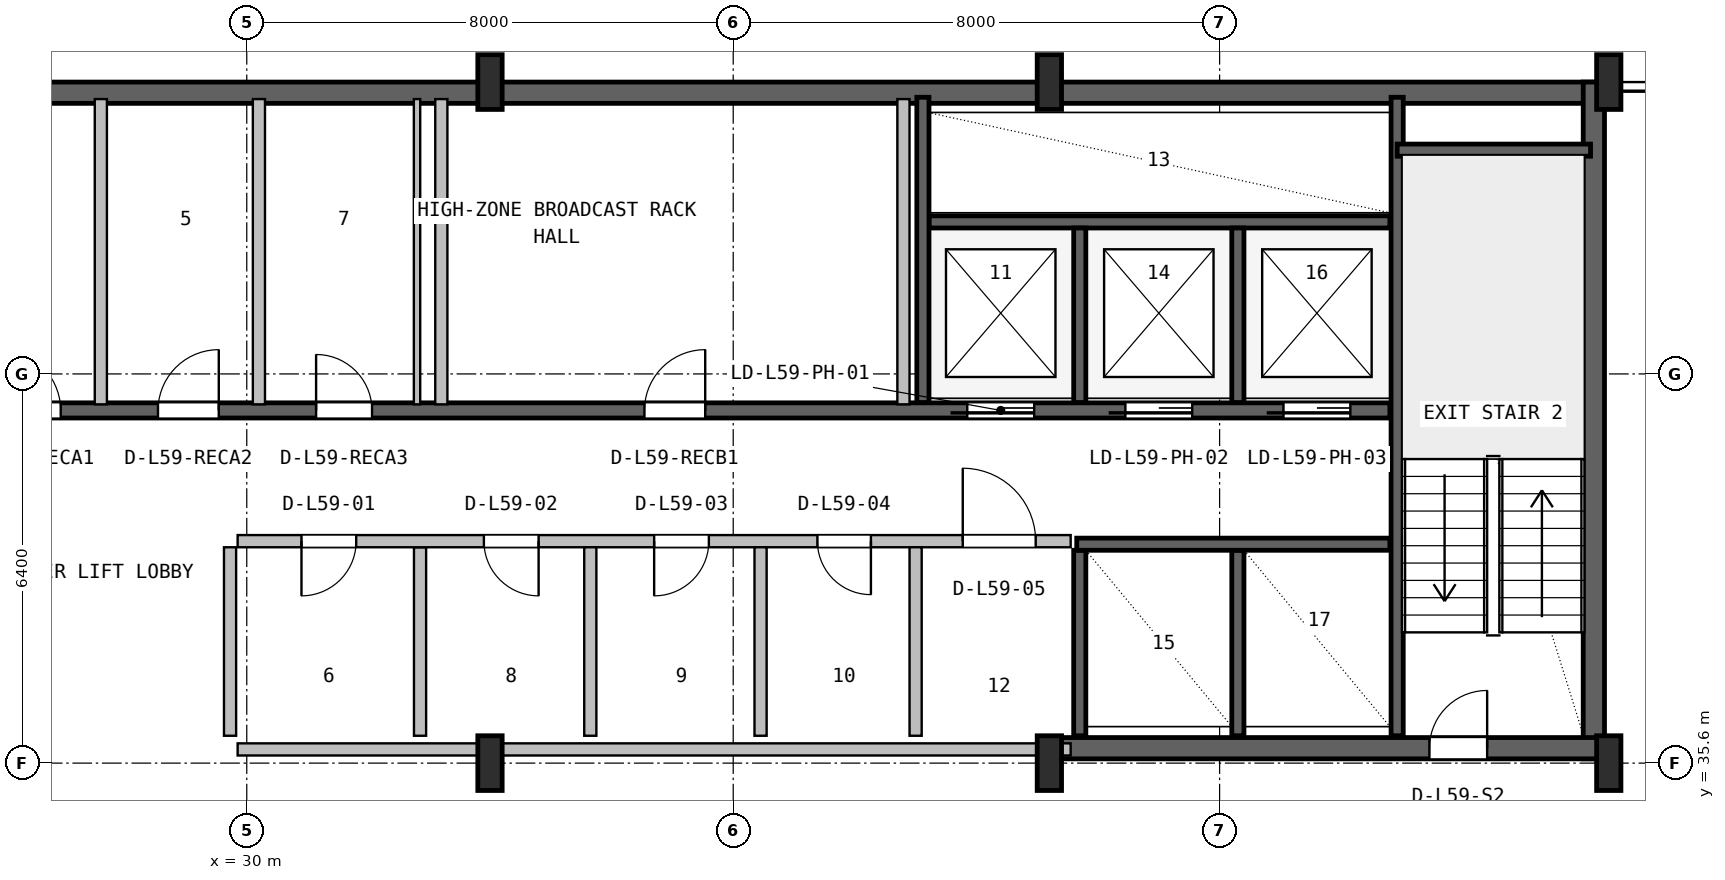
"""IFC4 building model, lengths in metres.
Left out: names, types, materials, properties, quantities, classifications, styles, units other than length and angle.
Written with IfcOpenShell. Run it as: python <this file> out.ifc"""

import sys

from ifc_helpers import new_model, si_unit, direction, frame, frame_2d, origin, origin_2d, place, context, subcontext, project, spatial, rectangle, i_section, extrude, source, transform, mapped, element, fill, save


model = new_model("IFC4")
c1 = context("Model", 3, precision=1e-05, world=origin(), true_north=direction((0.0, 1.0)))
c2 = subcontext(c1, "Body", "Model", "MODEL_VIEW")
j1 = project(units=[si_unit("LENGTHUNIT", "METRE"), si_unit("PLANEANGLEUNIT", "RADIAN")], contexts=[c1])
p1 = place(None, origin())
s1 = spatial("IfcSite", under=j1, at=p1, CompositionType="ELEMENT")
p2 = place(p1, origin())
s2 = spatial("IfcBuilding", under=s1, at=p2, CompositionType="ELEMENT")
p3 = place(p2, frame((0.0, 0.0, 239.4)))
s3 = spatial("IfcBuildingStorey", under=s2, at=p3, CompositionType="ELEMENT", Elevation=239.4)
p4 = place(p3, frame((15.6, 46.625, 0.0), z_axis=(0.0, 0.0, 1.0), x_axis=(1.0, 0.0, 0.0)))
e1 = element("IfcWall", 1, at=p4, inside=s3, PredefinedType="SHEAR", context=c2, shape_type="SweptSolid", body=[
    extrude(rectangle(XDim=36.8, YDim=0.35, at=frame_2d((18.4, 0.0))), origin(), (0.0, 0.0, 1.0), 3.55),
])
p5 = place(p3, frame((52.155, 35.67, 0.0), z_axis=(0.0, 0.0, 1.0), x_axis=(0.0, 1.0, 0.0)))
e2 = element("IfcWall", 2, at=p5, inside=s3, PredefinedType="SHEAR", context=c2, shape_type="SweptSolid", body=[
    extrude(rectangle(XDim=11.13, YDim=0.35, at=frame_2d((5.565, 0.0))), origin(), (0.0, 0.0, 1.0), 3.55),
])
p6 = place(p3, frame((43.2, 35.845, 0.0), z_axis=(0.0, 0.0, 1.0), x_axis=(1.0, 0.0, 0.0)))
e3 = element("IfcWall", 3, at=p6, inside=s3, PredefinedType="SHEAR", context=c2, shape_type="SweptSolid", body=[
    extrude(rectangle(XDim=9.13, YDim=0.35, at=frame_2d((4.565, 0.0))), origin(), (0.0, 0.0, 1.0), 3.55),
])
p7 = place(p6, frame((6.25, 0.0, 0.0)))
e4 = element("IfcOpeningElement", 4, at=p7, cuts=e3, PredefinedType="OPENING", context=c2, shape_type="SweptSolid", body=[
    extrude(rectangle(XDim=0.95, YDim=2.1, at=frame_2d((0.475, 1.05))), frame((0.0, 0.185, 0.0), z_axis=(0.0, -1.0, 0.0), x_axis=(1.0, 0.0, 0.0)), (0.0, 0.0, 1.0), 0.37),
])
m1 = source(origin(), c2, "Body", "SweptSolid", [
    extrude(i_section(OverallWidth=0.4, OverallDepth=0.9, WebThickness=0.016, FlangeThickness=0.028, FilletRadius=0.016, at=origin_2d()), origin(), (0.0, 0.0, 1.0), 3.8),
])
for number, where, z_axis, x_axis in (
    (5, (34.0, 35.6, 0.0), (0.0, 0.0, 1.0), (1.0, 0.0, 0.0)),
    (6, (34.0, 46.8, 0.0), (0.0, 0.0, 1.0), (1.0, 0.0, 0.0)),
    (7, (43.2, 35.6, 0.0), (0.0, 0.0, 1.0), (1.0, 0.0, 0.0)),
    (8, (43.2, 46.8, 0.0), (0.0, 0.0, 1.0), (1.0, 0.0, 0.0)),
    (9, (52.4, 35.6, 0.0), (0.0, 0.0, 1.0), (1.0, 0.0, 0.0)),
    (10, (52.4, 46.8, 0.0), (0.0, 0.0, 1.0), (1.0, 0.0, 0.0)),
):
    element("IfcColumn", number, at=place(p3, frame(where, z_axis=z_axis, x_axis=x_axis)), inside=s3, PredefinedType="COLUMN", context=c2, shape_type="MappedRepresentation", body=[
        mapped(m1, transform((0.0, 0.0, 0.0), x_axis=(1.0, 0.0, 0.0), y_axis=(0.0, 1.0, 0.0), z_axis=(0.0, 0.0, 1.0), scale=1.0)),
    ])
p8 = place(p3, frame((48.92, 36.05, 0.0), z_axis=(0.0, 0.0, 1.0), x_axis=(0.0, 1.0, 0.0)))
e11 = element("IfcWall", 11, at=p8, inside=s3, PredefinedType="SHEAR", context=c2, shape_type="SweptSolid", body=[
    extrude(rectangle(XDim=10.5, YDim=0.2, at=frame_2d((5.25, 0.0))), origin(), (0.0, 0.0, 1.0), 3.55),
])
p9 = place(p3, frame((48.92, 45.68, 0.0), z_axis=(0.0, 0.0, 1.0), x_axis=(1.0, 0.0, 0.0)))
e12 = element("IfcWall", 12, at=p9, inside=s3, PredefinedType="SHEAR", context=c2, shape_type="SweptSolid", body=[
    extrude(rectangle(XDim=3.18, YDim=0.2, at=frame_2d((1.59, 0.0))), origin(), (0.0, 0.0, 1.0), 3.55),
])
p10 = place(p3, frame((24.98, 41.4, 0.0), z_axis=(0.0, 0.0, 1.0), x_axis=(1.0, 0.0, 0.0)))
e13 = element("IfcWall", 13, at=p10, inside=s3, PredefinedType="SHEAR", context=c2, shape_type="SweptSolid", body=[
    extrude(rectangle(XDim=23.82, YDim=0.25, at=frame_2d((11.91, 0.0))), origin(), (0.0, 0.0, 1.0), 3.55),
])
p11 = place(p10, frame((16.87, 0.0, 0.0)))
e14 = element("IfcOpeningElement", 14, at=p11, cuts=e13, PredefinedType="OPENING", context=c2, shape_type="SweptSolid", body=[
    extrude(rectangle(XDim=1.1, YDim=2.18, at=frame_2d((0.55, 1.09))), frame((0.0, 0.135, 0.0), z_axis=(0.0, -1.0, 0.0), x_axis=(1.0, 0.0, 0.0)), (0.0, 0.0, 1.0), 0.27),
])
p12 = place(p10, frame((19.47, 0.0, 0.0)))
e15 = element("IfcOpeningElement", 15, at=p12, cuts=e13, PredefinedType="OPENING", context=c2, shape_type="SweptSolid", body=[
    extrude(rectangle(XDim=1.1, YDim=2.18, at=frame_2d((0.55, 1.09))), frame((0.0, 0.135, 0.0), z_axis=(0.0, -1.0, 0.0), x_axis=(1.0, 0.0, 0.0)), (0.0, 0.0, 1.0), 0.27),
])
p13 = place(p10, frame((22.07, 0.0, 0.0)))
e16 = element("IfcOpeningElement", 16, at=p13, cuts=e13, PredefinedType="OPENING", context=c2, shape_type="SweptSolid", body=[
    extrude(rectangle(XDim=1.1, YDim=2.18, at=frame_2d((0.55, 1.09))), frame((0.0, 0.135, 0.0), z_axis=(0.0, -1.0, 0.0), x_axis=(1.0, 0.0, 0.0)), (0.0, 0.0, 1.0), 0.27),
])
p14 = place(p10, frame((0.96, 0.0, 0.0)))
e17 = element("IfcOpeningElement", 17, at=p14, cuts=e13, PredefinedType="OPENING", context=c2, shape_type="SweptSolid", body=[
    extrude(rectangle(XDim=1.0, YDim=2.08, at=frame_2d((0.5, 1.04))), frame((0.0, 0.135, 0.0), z_axis=(0.0, -1.0, 0.0), x_axis=(1.0, 0.0, 0.0)), (0.0, 0.0, 1.0), 0.27),
])
p15 = place(p10, frame((3.56, 0.0, 0.0)))
e18 = element("IfcOpeningElement", 18, at=p15, cuts=e13, PredefinedType="OPENING", context=c2, shape_type="SweptSolid", body=[
    extrude(rectangle(XDim=1.0, YDim=2.08, at=frame_2d((0.5, 1.04))), frame((0.0, 0.135, 0.0), z_axis=(0.0, -1.0, 0.0), x_axis=(1.0, 0.0, 0.0)), (0.0, 0.0, 1.0), 0.27),
])
p16 = place(p10, frame((6.16, 0.0, 0.0)))
e19 = element("IfcOpeningElement", 19, at=p16, cuts=e13, PredefinedType="OPENING", context=c2, shape_type="SweptSolid", body=[
    extrude(rectangle(XDim=0.92, YDim=2.08, at=frame_2d((0.46, 1.04))), frame((0.0, 0.135, 0.0), z_axis=(0.0, -1.0, 0.0), x_axis=(1.0, 0.0, 0.0)), (0.0, 0.0, 1.0), 0.27),
])
p17 = place(p10, frame((11.56, 0.0, 0.0)))
e20 = element("IfcOpeningElement", 20, at=p17, cuts=e13, PredefinedType="OPENING", context=c2, shape_type="SweptSolid", body=[
    extrude(rectangle(XDim=1.0, YDim=2.08, at=frame_2d((0.5, 1.04))), frame((0.0, 0.135, 0.0), z_axis=(0.0, -1.0, 0.0), x_axis=(1.0, 0.0, 0.0)), (0.0, 0.0, 1.0), 0.27),
])
p18 = place(p3, frame((41.22, 44.5, 0.0), z_axis=(0.0, 0.0, 1.0), x_axis=(1.0, 0.0, 0.0)))
e21 = element("IfcWall", 21, at=p18, inside=s3, PredefinedType="SHEAR", context=c2, shape_type="SweptSolid", body=[
    extrude(rectangle(XDim=7.58, YDim=0.2, at=frame_2d((3.79, 0.0))), origin(), (0.0, 0.0, 1.0), 3.55),
])
p19 = place(p3, frame((41.12, 41.53, 0.0), z_axis=(0.0, 0.0, 1.0), x_axis=(0.0, 1.0, 0.0)))
e22 = element("IfcWall", 22, at=p19, inside=s3, PredefinedType="SHEAR", context=c2, shape_type="SweptSolid", body=[
    extrude(rectangle(XDim=5.02, YDim=0.2, at=frame_2d((2.51, 0.0))), origin(), (0.0, 0.0, 1.0), 3.55),
])
for number, where, z_axis, x_axis in (
    (23, (43.7, 41.53, 0.0), (0.0, 0.0, 1.0), (0.0, 1.0, 0.0)),
    (24, (46.3, 41.53, 0.0), (0.0, 0.0, 1.0), (0.0, 1.0, 0.0)),
):
    element("IfcWall", number, at=place(p3, frame(where, z_axis=z_axis, x_axis=x_axis)), inside=s3, PredefinedType="SHEAR", context=c2, shape_type="SweptSolid", body=[
        extrude(rectangle(XDim=2.87, YDim=0.2, at=frame_2d((1.435, 0.0))), origin(), (0.0, 0.0, 1.0), 3.55),
    ])
for number, where, z_axis, x_axis in (
    (25, (43.7, 36.05, 0.0), (0.0, 0.0, 1.0), (0.0, 1.0, 0.0)),
    (26, (46.3, 36.05, 0.0), (0.0, 0.0, 1.0), (0.0, 1.0, 0.0)),
):
    element("IfcWall", number, at=place(p3, frame(where, z_axis=z_axis, x_axis=x_axis)), inside=s3, PredefinedType="SHEAR", context=c2, shape_type="SweptSolid", body=[
        extrude(rectangle(XDim=3.05, YDim=0.2, at=frame_2d((1.525, 0.0))), origin(), (0.0, 0.0, 1.0), 3.55),
    ])
p20 = place(p3, frame((43.65, 39.2, 0.0), z_axis=(0.0, 0.0, 1.0), x_axis=(1.0, 0.0, 0.0)))
e27 = element("IfcWall", 27, at=p20, inside=s3, PredefinedType="SHEAR", context=c2, shape_type="SweptSolid", body=[
    extrude(rectangle(XDim=5.15, YDim=0.2, at=frame_2d((2.575, 0.0))), origin(), (0.0, 0.0, 1.0), 3.55),
])
p21 = place(p3, frame((29.85, 35.825, 0.0), z_axis=(0.0, 0.0, 1.0), x_axis=(1.0, 0.0, 0.0)))
e28 = element("IfcWall", 28, at=p21, inside=s3, PredefinedType="SOLIDWALL", context=c2, shape_type="SweptSolid", body=[
    extrude(rectangle(XDim=13.7, YDim=0.2, at=frame_2d((6.85, 0.0))), origin(), (0.0, 0.0, 1.0), 2.575),
])
p22 = place(p3, frame((32.85, 36.05, 0.0), z_axis=(0.0, 0.0, 1.0), x_axis=(0.0, 1.0, 0.0)))
e29 = element("IfcWall", 29, at=p22, inside=s3, PredefinedType="PLUMBINGWALL", context=c2, shape_type="SweptSolid", body=[
    extrude(rectangle(XDim=3.1, YDim=0.2, at=frame_2d((1.55, 0.0))), origin(), (0.0, 0.0, 1.0), 3.53),
])
p23 = place(p3, frame((29.85, 39.25, 0.0), z_axis=(0.0, 0.0, 1.0), x_axis=(1.0, 0.0, 0.0)))
e30 = element("IfcWall", 30, at=p23, inside=s3, PredefinedType="SOLIDWALL", context=c2, shape_type="SweptSolid", body=[
    extrude(rectangle(XDim=13.7, YDim=0.2, at=frame_2d((6.85, 0.0))), origin(), (0.0, 0.0, 1.0), 3.53),
])
p24 = place(p23, frame((1.05, 0.0, 0.0)))
e31 = element("IfcOpeningElement", 31, at=p24, cuts=e30, PredefinedType="OPENING", context=c2, shape_type="SweptSolid", body=[
    extrude(rectangle(XDim=0.9, YDim=2.06, at=frame_2d((0.45, 1.03))), frame((0.0, 0.11, 0.0), z_axis=(0.0, -1.0, 0.0), x_axis=(1.0, 0.0, 0.0)), (0.0, 0.0, 1.0), 0.22),
])
p25 = place(p23, frame((4.05, 0.0, 0.0)))
e32 = element("IfcOpeningElement", 32, at=p25, cuts=e30, PredefinedType="OPENING", context=c2, shape_type="SweptSolid", body=[
    extrude(rectangle(XDim=0.9, YDim=2.06, at=frame_2d((0.45, 1.03))), frame((0.0, 0.11, 0.0), z_axis=(0.0, -1.0, 0.0), x_axis=(1.0, 0.0, 0.0)), (0.0, 0.0, 1.0), 0.22),
])
p26 = place(p23, frame((6.85, 0.0, 0.0)))
e33 = element("IfcOpeningElement", 33, at=p26, cuts=e30, PredefinedType="OPENING", context=c2, shape_type="SweptSolid", body=[
    extrude(rectangle(XDim=0.9, YDim=2.06, at=frame_2d((0.45, 1.03))), frame((0.0, 0.11, 0.0), z_axis=(0.0, -1.0, 0.0), x_axis=(1.0, 0.0, 0.0)), (0.0, 0.0, 1.0), 0.22),
])
p27 = place(p23, frame((9.535, 0.0, 0.0)))
e34 = element("IfcOpeningElement", 34, at=p27, cuts=e30, PredefinedType="OPENING", context=c2, shape_type="SweptSolid", body=[
    extrude(rectangle(XDim=0.88, YDim=2.06, at=frame_2d((0.44, 1.03))), frame((0.0, 0.11, 0.0), z_axis=(0.0, -1.0, 0.0), x_axis=(1.0, 0.0, 0.0)), (0.0, 0.0, 1.0), 0.22),
])
p28 = place(p23, frame((11.925, 0.0, 0.0)))
e35 = element("IfcOpeningElement", 35, at=p28, cuts=e30, PredefinedType="OPENING", context=c2, shape_type="SweptSolid", body=[
    extrude(rectangle(XDim=1.2, YDim=2.1, at=frame_2d((0.6, 1.05))), frame((0.0, 0.11, 0.0), z_axis=(0.0, -1.0, 0.0), x_axis=(1.0, 0.0, 0.0)), (0.0, 0.0, 1.0), 0.22),
])
for number, where, z_axis, x_axis in (
    (36, (29.725, 36.05, 0.0), (0.0, 0.0, 1.0), (0.0, 1.0, 0.0)),
    (37, (35.65, 36.05, 0.0), (0.0, 0.0, 1.0), (0.0, 1.0, 0.0)),
    (38, (38.45, 36.05, 0.0), (0.0, 0.0, 1.0), (0.0, 1.0, 0.0)),
):
    element("IfcWall", number, at=place(p3, frame(where, z_axis=z_axis, x_axis=x_axis)), inside=s3, PredefinedType="PLUMBINGWALL", context=c2, shape_type="SweptSolid", body=[
        extrude(rectangle(XDim=3.1, YDim=0.2, at=frame_2d((1.55, 0.0))), origin(), (0.0, 0.0, 1.0), 3.53),
    ])
p29 = place(p3, frame((41.0, 36.05, 0.0), z_axis=(0.0, 0.0, 1.0), x_axis=(0.0, 1.0, 0.0)))
e39 = element("IfcWall", 39, at=p29, inside=s3, PredefinedType="SOLIDWALL", context=c2, shape_type="SweptSolid", body=[
    extrude(rectangle(XDim=3.1, YDim=0.2, at=frame_2d((1.55, 0.0))), origin(), (0.0, 0.0, 1.0), 3.53),
])
for number, where, z_axis, x_axis in (
    (40, (27.6, 41.5, 0.0), (0.0, 0.0, 1.0), (0.0, 1.0, 0.0)),
    (41, (30.2, 41.5, 0.0), (0.0, 0.0, 1.0), (0.0, 1.0, 0.0)),
):
    element("IfcWall", number, at=place(p3, frame(where, z_axis=z_axis, x_axis=x_axis)), inside=s3, PredefinedType="SOLIDWALL", context=c2, shape_type="SweptSolid", body=[
        extrude(rectangle(XDim=5.02, YDim=0.2, at=frame_2d((2.51, 0.0))), origin(), (0.0, 0.0, 1.0), 3.53),
    ])
p30 = place(p3, frame((32.8, 41.5, 0.0), z_axis=(0.0, 0.0, 1.0), x_axis=(0.0, 1.0, 0.0)))
e42 = element("IfcWall", 42, at=p30, inside=s3, PredefinedType="PARTITIONING", context=c2, shape_type="SweptSolid", body=[
    extrude(rectangle(XDim=5.02, YDim=0.105, at=frame_2d((2.51, 0.0))), origin(), (0.0, 0.0, 1.0), 3.53),
])
for number, where, z_axis, x_axis in (
    (43, (40.8, 41.5, 0.0), (0.0, 0.0, 1.0), (0.0, 1.0, 0.0)),
    (44, (33.2, 41.5, 0.0), (0.0, 0.0, 1.0), (0.0, 1.0, 0.0)),
):
    element("IfcWall", number, at=place(p3, frame(where, z_axis=z_axis, x_axis=x_axis)), inside=s3, PredefinedType="SOLIDWALL", context=c2, shape_type="SweptSolid", body=[
        extrude(rectangle(XDim=5.02, YDim=0.2, at=frame_2d((2.51, 0.0))), origin(), (0.0, 0.0, 1.0), 3.53),
    ])
m2 = source(origin(), c2, "Body", "SweptSolid", [
    extrude(rectangle(XDim=0.95, YDim=2.1, at=frame_2d((0.475, 1.05))), frame((0.0, 0.025, 0.0), z_axis=(0.0, -1.0, 0.0), x_axis=(1.0, 0.0, 0.0)), (0.0, 0.0, 1.0), 0.05),
])
p31 = place(p7, origin())
e45 = element("IfcDoor", 45, at=p31, inside=s3, OperationType="SINGLE_SWING_RIGHT", PredefinedType="DOOR", context=c2, shape_type="MappedRepresentation", body=[
    mapped(m2, transform((0.0, 0.0, 0.0), x_axis=(1.0, 0.0, 0.0), y_axis=(0.0, 1.0, 0.0), z_axis=(0.0, 0.0, 1.0), scale=1.0)),
])
fill(e4, e45)
m3 = source(origin(), c2, "Body", "SweptSolid", [
    extrude(rectangle(XDim=1.1, YDim=2.18, at=frame_2d((0.55, 1.09))), frame((0.0, 0.025, 0.0), z_axis=(0.0, -1.0, 0.0), x_axis=(1.0, 0.0, 0.0)), (0.0, 0.0, 1.0), 0.05),
])
p32 = place(p11, frame((1.1, 0.0, 0.0), z_axis=(0.0, 0.0, 1.0), x_axis=(-1.0, 0.0, 0.0)))
e46 = element("IfcDoor", 46, at=p32, inside=s3, OperationType="SLIDING_TO_LEFT", PredefinedType="DOOR", context=c2, shape_type="MappedRepresentation", body=[
    mapped(m3, transform((0.0, 0.0, 0.0), x_axis=(1.0, 0.0, 0.0), y_axis=(0.0, 1.0, 0.0), z_axis=(0.0, 0.0, 1.0), scale=1.0)),
])
fill(e14, e46)
p33 = place(p12, frame((1.1, 0.0, 0.0), z_axis=(0.0, 0.0, 1.0), x_axis=(-1.0, 0.0, 0.0)))
e47 = element("IfcDoor", 47, at=p33, inside=s3, OperationType="SLIDING_TO_LEFT", PredefinedType="DOOR", context=c2, shape_type="MappedRepresentation", body=[
    mapped(m3, transform((0.0, 0.0, 0.0), x_axis=(1.0, 0.0, 0.0), y_axis=(0.0, 1.0, 0.0), z_axis=(0.0, 0.0, 1.0), scale=1.0)),
])
fill(e15, e47)
p34 = place(p13, frame((1.1, 0.0, 0.0), z_axis=(0.0, 0.0, 1.0), x_axis=(-1.0, 0.0, 0.0)))
e48 = element("IfcDoor", 48, at=p34, inside=s3, OperationType="SLIDING_TO_LEFT", PredefinedType="DOOR", context=c2, shape_type="MappedRepresentation", body=[
    mapped(m3, transform((0.0, 0.0, 0.0), x_axis=(1.0, 0.0, 0.0), y_axis=(0.0, 1.0, 0.0), z_axis=(0.0, 0.0, 1.0), scale=1.0)),
])
fill(e16, e48)
m4 = source(origin(), c2, "Body", "SweptSolid", [
    extrude(rectangle(XDim=1.0, YDim=2.08, at=frame_2d((0.5, 1.04))), frame((0.0, 0.025, 0.0), z_axis=(0.0, -1.0, 0.0), x_axis=(1.0, 0.0, 0.0)), (0.0, 0.0, 1.0), 0.05),
])
p35 = place(p14, origin())
e49 = element("IfcDoor", 49, at=p35, inside=s3, OperationType="SINGLE_SWING_LEFT", PredefinedType="DOOR", context=c2, shape_type="MappedRepresentation", body=[
    mapped(m4, transform((0.0, 0.0, 0.0), x_axis=(1.0, 0.0, 0.0), y_axis=(0.0, 1.0, 0.0), z_axis=(0.0, 0.0, 1.0), scale=1.0)),
])
fill(e17, e49)
p36 = place(p15, origin())
e50 = element("IfcDoor", 50, at=p36, inside=s3, OperationType="SINGLE_SWING_RIGHT", PredefinedType="DOOR", context=c2, shape_type="MappedRepresentation", body=[
    mapped(m4, transform((0.0, 0.0, 0.0), x_axis=(1.0, 0.0, 0.0), y_axis=(0.0, 1.0, 0.0), z_axis=(0.0, 0.0, 1.0), scale=1.0)),
])
fill(e18, e50)
m5 = source(origin(), c2, "Body", "SweptSolid", [
    extrude(rectangle(XDim=0.92, YDim=2.08, at=frame_2d((0.46, 1.04))), frame((0.0, 0.025, 0.0), z_axis=(0.0, -1.0, 0.0), x_axis=(1.0, 0.0, 0.0)), (0.0, 0.0, 1.0), 0.05),
])
p37 = place(p16, origin())
e51 = element("IfcDoor", 51, at=p37, inside=s3, OperationType="SINGLE_SWING_LEFT", PredefinedType="DOOR", context=c2, shape_type="MappedRepresentation", body=[
    mapped(m5, transform((0.0, 0.0, 0.0), x_axis=(1.0, 0.0, 0.0), y_axis=(0.0, 1.0, 0.0), z_axis=(0.0, 0.0, 1.0), scale=1.0)),
])
fill(e19, e51)
p38 = place(p17, origin())
e52 = element("IfcDoor", 52, at=p38, inside=s3, OperationType="SINGLE_SWING_RIGHT", PredefinedType="DOOR", context=c2, shape_type="MappedRepresentation", body=[
    mapped(m4, transform((0.0, 0.0, 0.0), x_axis=(1.0, 0.0, 0.0), y_axis=(0.0, 1.0, 0.0), z_axis=(0.0, 0.0, 1.0), scale=1.0)),
])
fill(e20, e52)
m6 = source(origin(), c2, "Body", "SweptSolid", [
    extrude(rectangle(XDim=0.9, YDim=2.06, at=frame_2d((0.45, 1.03))), frame((0.0, 0.025, 0.0), z_axis=(0.0, -1.0, 0.0), x_axis=(1.0, 0.0, 0.0)), (0.0, 0.0, 1.0), 0.05),
])
p39 = place(p24, frame((0.9, 0.0, 0.0), z_axis=(0.0, 0.0, 1.0), x_axis=(-1.0, 0.0, 0.0)))
e53 = element("IfcDoor", 53, at=p39, inside=s3, OperationType="SINGLE_SWING_LEFT", PredefinedType="DOOR", context=c2, shape_type="MappedRepresentation", body=[
    mapped(m6, transform((0.0, 0.0, 0.0), x_axis=(1.0, 0.0, 0.0), y_axis=(0.0, 1.0, 0.0), z_axis=(0.0, 0.0, 1.0), scale=1.0)),
])
fill(e31, e53)
p40 = place(p25, frame((0.9, 0.0, 0.0), z_axis=(0.0, 0.0, 1.0), x_axis=(-1.0, 0.0, 0.0)))
e54 = element("IfcDoor", 54, at=p40, inside=s3, OperationType="SINGLE_SWING_RIGHT", PredefinedType="DOOR", context=c2, shape_type="MappedRepresentation", body=[
    mapped(m6, transform((0.0, 0.0, 0.0), x_axis=(1.0, 0.0, 0.0), y_axis=(0.0, 1.0, 0.0), z_axis=(0.0, 0.0, 1.0), scale=1.0)),
])
fill(e32, e54)
p41 = place(p26, frame((0.9, 0.0, 0.0), z_axis=(0.0, 0.0, 1.0), x_axis=(-1.0, 0.0, 0.0)))
e55 = element("IfcDoor", 55, at=p41, inside=s3, OperationType="SINGLE_SWING_LEFT", PredefinedType="DOOR", context=c2, shape_type="MappedRepresentation", body=[
    mapped(m6, transform((0.0, 0.0, 0.0), x_axis=(1.0, 0.0, 0.0), y_axis=(0.0, 1.0, 0.0), z_axis=(0.0, 0.0, 1.0), scale=1.0)),
])
fill(e33, e55)
m7 = source(origin(), c2, "Body", "SweptSolid", [
    extrude(rectangle(XDim=0.88, YDim=2.06, at=frame_2d((0.44, 1.03))), frame((0.0, 0.025, 0.0), z_axis=(0.0, -1.0, 0.0), x_axis=(1.0, 0.0, 0.0)), (0.0, 0.0, 1.0), 0.05),
])
p42 = place(p27, frame((0.88, 0.0, 0.0), z_axis=(0.0, 0.0, 1.0), x_axis=(-1.0, 0.0, 0.0)))
e56 = element("IfcDoor", 56, at=p42, inside=s3, OperationType="SINGLE_SWING_RIGHT", PredefinedType="DOOR", context=c2, shape_type="MappedRepresentation", body=[
    mapped(m7, transform((0.0, 0.0, 0.0), x_axis=(1.0, 0.0, 0.0), y_axis=(0.0, 1.0, 0.0), z_axis=(0.0, 0.0, 1.0), scale=1.0)),
])
fill(e34, e56)
m8 = source(origin(), c2, "Body", "SweptSolid", [
    extrude(rectangle(XDim=1.2, YDim=2.1, at=frame_2d((0.6, 1.05))), frame((0.0, 0.025, 0.0), z_axis=(0.0, -1.0, 0.0), x_axis=(1.0, 0.0, 0.0)), (0.0, 0.0, 1.0), 0.05),
])
p43 = place(p28, origin())
e57 = element("IfcDoor", 57, at=p43, inside=s3, OperationType="SINGLE_SWING_LEFT", PredefinedType="DOOR", context=c2, shape_type="MappedRepresentation", body=[
    mapped(m8, transform((0.0, 0.0, 0.0), x_axis=(1.0, 0.0, 0.0), y_axis=(0.0, 1.0, 0.0), z_axis=(0.0, 0.0, 1.0), scale=1.0)),
])
fill(e35, e57)
save(model, sys.argv[1])
